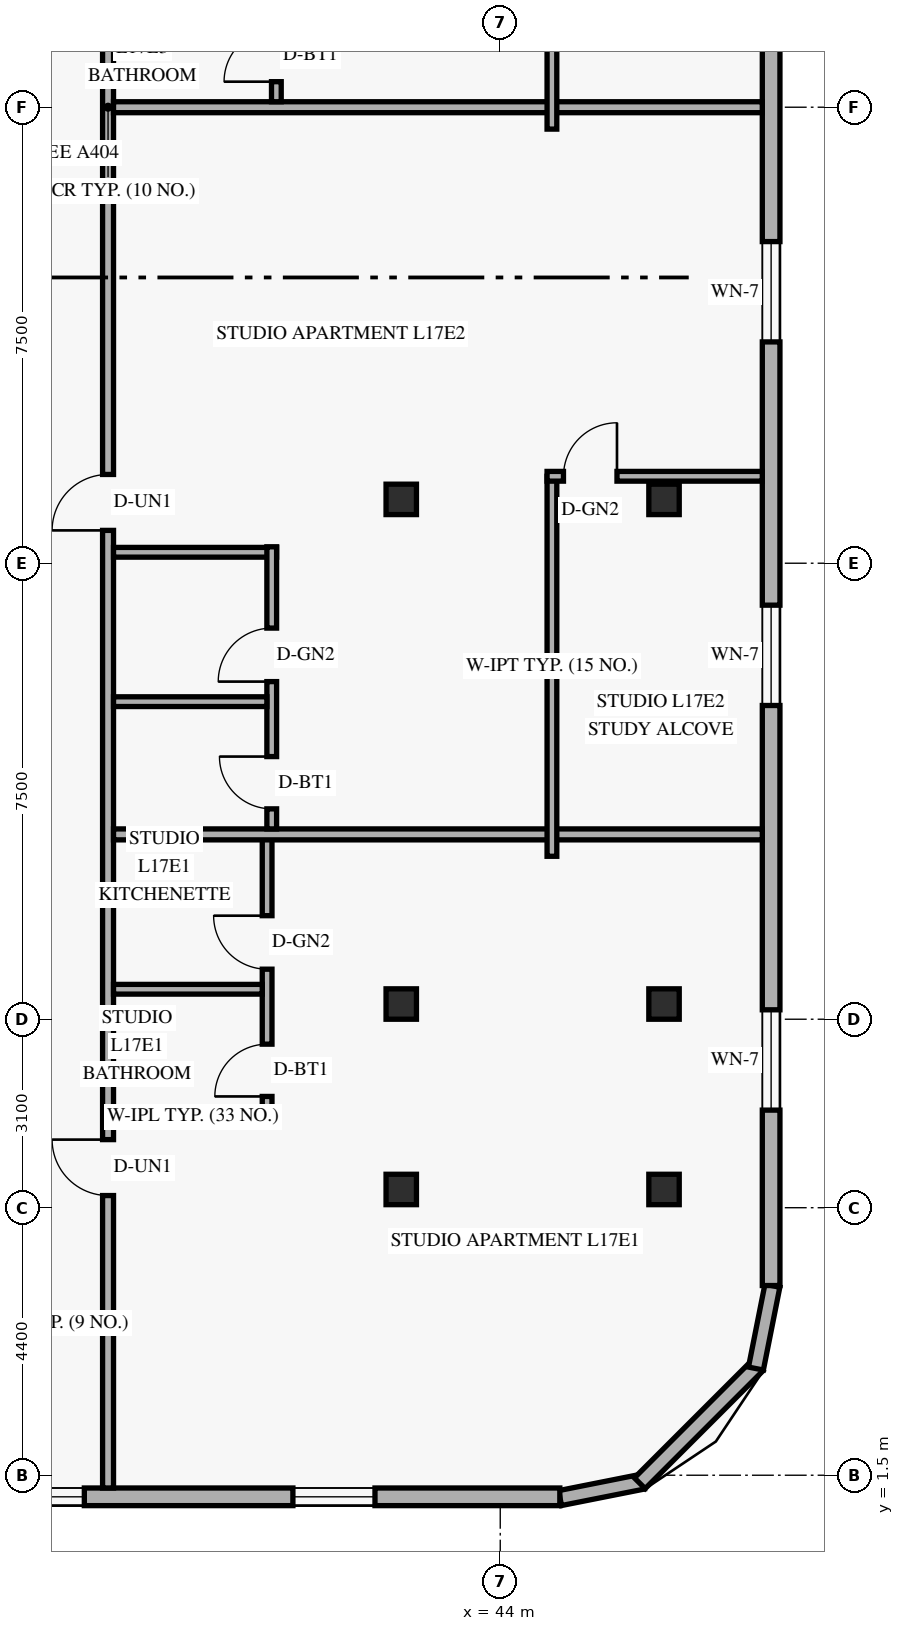
"""IFC4 building model, lengths in metres.
Left out: names, types, materials, properties, quantities, classifications, styles, units other than length and angle.
Written with IfcOpenShell. Run it as: python <this file> out.ifc"""

import sys

from ifc_helpers import new_model, si_unit, direction, frame, frame_2d, origin, origin_2d, place, context, subcontext, project, spatial, rectangle, hollow_rectangle, extrude, element, fill, save


model = new_model("IFC4")
c1 = context("Model", 3, precision=1e-05, world=origin(), true_north=direction((0.0, 1.0)))
c2 = subcontext(c1, "Body", "Model", "MODEL_VIEW")
j1 = project(units=[si_unit("LENGTHUNIT", "METRE"), si_unit("PLANEANGLEUNIT", "RADIAN")], contexts=[c1])
p1 = place(None, origin())
s1 = spatial("IfcSite", under=j1, at=p1, CompositionType="ELEMENT")
p2 = place(p1, origin())
s2 = spatial("IfcBuilding", under=s1, at=p2, CompositionType="ELEMENT")
p3 = place(p2, frame((0.0, 0.0, 67.8)))
s3 = spatial("IfcBuildingStorey", under=s2, at=p3, CompositionType="ELEMENT", Elevation=67.8)
for number, where, z_axis, x_axis in (
    (1, (42.309, 6.2, 0.0), (0.035, 0.0, 0.999), (0.0, 1.0, 0.0)),
    (2, (42.309, 9.25, 0.0), (0.035, 0.0, 0.999), (0.0, 1.0, 0.0)),
    (3, (42.309, 17.55, 0.0), (0.035, 0.0, 0.999), (0.0, 1.0, 0.0)),
):
    element("IfcColumn", number, at=place(p3, frame(where, z_axis=z_axis, x_axis=x_axis)), inside=s3, PredefinedType="COLUMN", context=c2, shape_type="SweptSolid", body=[
        extrude(hollow_rectangle(XDim=0.5, YDim=0.5, WallThickness=0.022, at=origin_2d()), origin(), (0.0, 0.0, 1.0), 3.602),
    ])
for number, where, z_axis, x_axis in (
    (4, (46.589, 6.2, 0.0), (0.058, 0.0, 0.998), (0.0, 1.0, 0.0)),
    (5, (46.589, 9.25, 0.0), (0.058, 0.0, 0.998), (0.0, 1.0, 0.0)),
    (6, (46.589, 17.55, 0.0), (0.058, 0.0, 0.998), (0.0, 1.0, 0.0)),
):
    element("IfcColumn", number, at=place(p3, frame(where, z_axis=z_axis, x_axis=x_axis)), inside=s3, PredefinedType="COLUMN", context=c2, shape_type="SweptSolid", body=[
        extrude(hollow_rectangle(XDim=0.5, YDim=0.5, WallThickness=0.022, at=origin_2d()), origin(), (0.0, 0.0, 1.0), 3.606),
    ])
p4 = place(p3, frame((44.983, 1.124, 0.0), z_axis=(0.0, 0.0, 1.0), x_axis=(0.980809899341, 0.19496651342, 0.0)))
e7 = element("IfcWall", 7, at=p4, inside=s3, PredefinedType="SOLIDWALL", context=c2, shape_type="SweptSolid", body=[
    extrude(rectangle(XDim=1.389, YDim=0.25, at=frame_2d((0.694, 0.0))), origin(), (0.0, 0.0, 1.0), 3.3),
])
p5 = place(p3, frame((46.295, 1.368, 0.0), z_axis=(0.0, 0.0, 1.0), x_axis=(0.707106781187, 0.707106781187, 0.0)))
e8 = element("IfcWall", 8, at=p5, inside=s3, PredefinedType="SOLIDWALL", context=c2, shape_type="SweptSolid", body=[
    extrude(rectangle(XDim=2.739, YDim=0.25, at=frame_2d((1.37, 0.0))), origin(), (0.0, 0.0, 1.0), 3.3),
])
p6 = place(p3, frame((48.205, 3.254, 0.0), z_axis=(0.0, 0.0, 1.0), x_axis=(0.19496651342, 0.980809899341, 0.0)))
e9 = element("IfcWall", 9, at=p6, inside=s3, PredefinedType="SOLIDWALL", context=c2, shape_type="SweptSolid", body=[
    extrude(rectangle(XDim=1.389, YDim=0.25, at=frame_2d((0.694, 0.0))), origin(), (0.0, 0.0, 1.0), 3.3),
])
p7 = place(p3, frame((5.42, 1.145, 0.0), z_axis=(0.0, 0.0, 1.0), x_axis=(1.0, 0.0, 0.0)))
e10 = element("IfcWall", 10, at=p7, inside=s3, PredefinedType="SOLIDWALL", context=c2, shape_type="SweptSolid", body=[
    extrude(rectangle(XDim=39.56, YDim=0.29, at=frame_2d((19.78, 0.0))), origin(), (0.0, 0.0, 1.0), 3.3),
])
p8 = place(p7, frame((2.765, 0.0, 0.85)))
e11 = element("IfcOpeningElement", 11, at=p8, cuts=e10, PredefinedType="OPENING", context=c2, shape_type="SweptSolid", body=[
    extrude(rectangle(XDim=1.35, YDim=1.55, at=frame_2d((0.675, 0.775))), frame((0.0, 0.155, 0.0), z_axis=(0.0, -1.0, 0.0), x_axis=(1.0, 0.0, 0.0)), (0.0, 0.0, 1.0), 0.31),
])
p9 = place(p7, frame((7.18, 0.0, 0.85)))
e12 = element("IfcOpeningElement", 12, at=p9, cuts=e10, PredefinedType="OPENING", context=c2, shape_type="SweptSolid", body=[
    extrude(rectangle(XDim=1.2, YDim=1.5, at=frame_2d((0.6, 0.75))), frame((0.0, 0.155, 0.0), z_axis=(0.0, -1.0, 0.0), x_axis=(1.0, 0.0, 0.0)), (0.0, 0.0, 1.0), 0.31),
])
p10 = place(p7, frame((12.056, 0.0, 0.85)))
e13 = element("IfcOpeningElement", 13, at=p10, cuts=e10, PredefinedType="OPENING", context=c2, shape_type="SweptSolid", body=[
    extrude(rectangle(XDim=1.35, YDim=1.55, at=frame_2d((0.675, 0.775))), frame((0.0, 0.155, 0.0), z_axis=(0.0, -1.0, 0.0), x_axis=(1.0, 0.0, 0.0)), (0.0, 0.0, 1.0), 0.31),
])
p11 = place(p7, frame((18.665, 0.0, 0.85)))
e14 = element("IfcOpeningElement", 14, at=p11, cuts=e10, PredefinedType="OPENING", context=c2, shape_type="SweptSolid", body=[
    extrude(rectangle(XDim=1.35, YDim=1.55, at=frame_2d((0.675, 0.775))), frame((0.0, 0.155, 0.0), z_axis=(0.0, -1.0, 0.0), x_axis=(1.0, 0.0, 0.0)), (0.0, 0.0, 1.0), 0.31),
])
p12 = place(p7, frame((25.274, 0.0, 0.85)))
e15 = element("IfcOpeningElement", 15, at=p12, cuts=e10, PredefinedType="OPENING", context=c2, shape_type="SweptSolid", body=[
    extrude(rectangle(XDim=1.35, YDim=1.55, at=frame_2d((0.675, 0.775))), frame((0.0, 0.155, 0.0), z_axis=(0.0, -1.0, 0.0), x_axis=(1.0, 0.0, 0.0)), (0.0, 0.0, 1.0), 0.31),
])
p13 = place(p7, frame((30.39, 0.0, 0.85)))
e16 = element("IfcOpeningElement", 16, at=p13, cuts=e10, PredefinedType="OPENING", context=c2, shape_type="SweptSolid", body=[
    extrude(rectangle(XDim=1.35, YDim=1.55, at=frame_2d((0.675, 0.775))), frame((0.0, 0.155, 0.0), z_axis=(0.0, -1.0, 0.0), x_axis=(1.0, 0.0, 0.0)), (0.0, 0.0, 1.0), 0.31),
])
p14 = place(p7, frame((35.17, 0.0, 0.85)))
e17 = element("IfcOpeningElement", 17, at=p14, cuts=e10, PredefinedType="OPENING", context=c2, shape_type="SweptSolid", body=[
    extrude(rectangle(XDim=1.35, YDim=1.55, at=frame_2d((0.675, 0.775))), frame((0.0, 0.155, 0.0), z_axis=(0.0, -1.0, 0.0), x_axis=(1.0, 0.0, 0.0)), (0.0, 0.0, 1.0), 0.31),
])
p15 = place(p3, frame((48.455, 4.62, 0.0), z_axis=(0.0, 0.0, 1.0), x_axis=(0.0, 1.0, 0.0)))
e18 = element("IfcWall", 18, at=p15, inside=s3, PredefinedType="SOLIDWALL", context=c2, shape_type="SweptSolid", body=[
    extrude(rectangle(XDim=38.76, YDim=0.29, at=frame_2d((19.38, 0.0))), origin(), (0.0, 0.0, 1.0), 3.3),
])
p16 = place(p15, frame((2.885, 0.0, 0.85)))
e19 = element("IfcOpeningElement", 19, at=p16, cuts=e18, PredefinedType="OPENING", context=c2, shape_type="SweptSolid", body=[
    extrude(rectangle(XDim=1.65, YDim=1.6, at=frame_2d((0.825, 0.8))), frame((0.0, 0.155, 0.0), z_axis=(0.0, -1.0, 0.0), x_axis=(1.0, 0.0, 0.0)), (0.0, 0.0, 1.0), 0.31),
])
p17 = place(p15, frame((9.54, 0.0, 0.85)))
e20 = element("IfcOpeningElement", 20, at=p17, cuts=e18, PredefinedType="OPENING", context=c2, shape_type="SweptSolid", body=[
    extrude(rectangle(XDim=1.65, YDim=1.6, at=frame_2d((0.825, 0.8))), frame((0.0, 0.155, 0.0), z_axis=(0.0, -1.0, 0.0), x_axis=(1.0, 0.0, 0.0)), (0.0, 0.0, 1.0), 0.31),
])
p18 = place(p15, frame((15.52, 0.0, 0.85)))
e21 = element("IfcOpeningElement", 21, at=p18, cuts=e18, PredefinedType="OPENING", context=c2, shape_type="SweptSolid", body=[
    extrude(rectangle(XDim=1.65, YDim=1.6, at=frame_2d((0.825, 0.8))), frame((0.0, 0.155, 0.0), z_axis=(0.0, -1.0, 0.0), x_axis=(1.0, 0.0, 0.0)), (0.0, 0.0, 1.0), 0.31),
])
p19 = place(p15, frame((21.5, 0.0, 0.85)))
e22 = element("IfcOpeningElement", 22, at=p19, cuts=e18, PredefinedType="OPENING", context=c2, shape_type="SweptSolid", body=[
    extrude(rectangle(XDim=1.65, YDim=1.6, at=frame_2d((0.825, 0.8))), frame((0.0, 0.155, 0.0), z_axis=(0.0, -1.0, 0.0), x_axis=(1.0, 0.0, 0.0)), (0.0, 0.0, 1.0), 0.31),
])
p20 = place(p15, frame((27.48, 0.0, 0.85)))
e23 = element("IfcOpeningElement", 23, at=p20, cuts=e18, PredefinedType="OPENING", context=c2, shape_type="SweptSolid", body=[
    extrude(rectangle(XDim=1.65, YDim=1.6, at=frame_2d((0.825, 0.8))), frame((0.0, 0.155, 0.0), z_axis=(0.0, -1.0, 0.0), x_axis=(1.0, 0.0, 0.0)), (0.0, 0.0, 1.0), 0.31),
])
p21 = place(p15, frame((34.225, 0.0, 0.85)))
e24 = element("IfcOpeningElement", 24, at=p21, cuts=e18, PredefinedType="OPENING", context=c2, shape_type="SweptSolid", body=[
    extrude(rectangle(XDim=1.65, YDim=1.6, at=frame_2d((0.825, 0.8))), frame((0.0, 0.155, 0.0), z_axis=(0.0, -1.0, 0.0), x_axis=(1.0, 0.0, 0.0)), (0.0, 0.0, 1.0), 0.31),
])
p22 = place(p3, frame((37.55, 1.29, 0.0), z_axis=(0.0, 0.0, 1.0), x_axis=(0.0, 1.0, 0.0)))
e25 = element("IfcWall", 25, at=p22, inside=s3, PredefinedType="STANDARD", context=c2, shape_type="SweptSolid", body=[
    extrude(rectangle(XDim=45.42, YDim=0.18, at=frame_2d((22.71, 0.0))), origin(), (0.0, 0.0, 1.0), 2.589),
])
p23 = place(p22, frame((4.81, 0.0, 0.0)))
e26 = element("IfcOpeningElement", 26, at=p23, cuts=e25, PredefinedType="OPENING", context=c2, shape_type="SweptSolid", body=[
    extrude(rectangle(XDim=0.92, YDim=2.15, at=frame_2d((0.46, 1.075))), frame((0.0, 0.1, 0.0), z_axis=(0.0, -1.0, 0.0), x_axis=(1.0, 0.0, 0.0)), (0.0, 0.0, 1.0), 0.2),
])
p24 = place(p22, frame((15.75, 0.0, 0.0)))
e27 = element("IfcOpeningElement", 27, at=p24, cuts=e25, PredefinedType="OPENING", context=c2, shape_type="SweptSolid", body=[
    extrude(rectangle(XDim=0.92, YDim=2.15, at=frame_2d((0.46, 1.075))), frame((0.0, 0.1, 0.0), z_axis=(0.0, -1.0, 0.0), x_axis=(1.0, 0.0, 0.0)), (0.0, 0.0, 1.0), 0.2),
])
p25 = place(p22, frame((27.71, 0.0, 0.0)))
e28 = element("IfcOpeningElement", 28, at=p25, cuts=e25, PredefinedType="OPENING", context=c2, shape_type="SweptSolid", body=[
    extrude(rectangle(XDim=0.92, YDim=2.15, at=frame_2d((0.46, 1.075))), frame((0.0, 0.1, 0.0), z_axis=(0.0, -1.0, 0.0), x_axis=(1.0, 0.0, 0.0)), (0.0, 0.0, 1.0), 0.2),
])
p26 = place(p22, frame((36.422, 0.0, 0.0)))
e29 = element("IfcOpeningElement", 29, at=p26, cuts=e25, PredefinedType="OPENING", context=c2, shape_type="SweptSolid", body=[
    extrude(rectangle(XDim=0.92, YDim=2.15, at=frame_2d((0.46, 1.075))), frame((0.0, 0.1, 0.0), z_axis=(0.0, -1.0, 0.0), x_axis=(1.0, 0.0, 0.0)), (0.0, 0.0, 1.0), 0.2),
])
p27 = place(p3, frame((37.64, 7.4, 0.0), z_axis=(0.0, 0.0, 1.0), x_axis=(1.0, 0.0, 0.0)))
e30 = element("IfcWall", 30, at=p27, inside=s3, PredefinedType="PLUMBINGWALL", context=c2, shape_type="SweptSolid", body=[
    extrude(rectangle(XDim=2.606, YDim=0.16, at=frame_2d((1.303, 0.0))), origin(), (0.0, 0.0, 1.0), 3.3),
])
p28 = place(p3, frame((40.166, 7.31, 0.0), z_axis=(0.0, 0.0, 1.0), x_axis=(0.0, 1.0, 0.0)))
e31 = element("IfcWall", 31, at=p28, inside=s3, PredefinedType="PLUMBINGWALL", context=c2, shape_type="SweptSolid", body=[
    extrude(rectangle(XDim=4.73, YDim=0.16, at=frame_2d((2.365, 0.0))), origin(), (0.0, 0.0, 1.0), 2.589),
])
p29 = place(p28, frame((0.42, 0.0, 0.0)))
e32 = element("IfcOpeningElement", 32, at=p29, cuts=e31, PredefinedType="OPENING", context=c2, shape_type="SweptSolid", body=[
    extrude(rectangle(XDim=0.86, YDim=2.12, at=frame_2d((0.43, 1.06))), frame((0.0, 0.09, 0.0), z_axis=(0.0, -1.0, 0.0), x_axis=(1.0, 0.0, 0.0)), (0.0, 0.0, 1.0), 0.18),
])
p30 = place(p28, frame((2.513, 0.0, 0.0)))
e33 = element("IfcOpeningElement", 33, at=p30, cuts=e31, PredefinedType="OPENING", context=c2, shape_type="SweptSolid", body=[
    extrude(rectangle(XDim=0.88, YDim=2.12, at=frame_2d((0.44, 1.06))), frame((0.0, 0.09, 0.0), z_axis=(0.0, -1.0, 0.0), x_axis=(1.0, 0.0, 0.0)), (0.0, 0.0, 1.0), 0.18),
])
p31 = place(p3, frame((37.64, 9.493, 0.0), z_axis=(0.0, 0.0, 1.0), x_axis=(1.0, 0.0, 0.0)))
e34 = element("IfcWall", 34, at=p31, inside=s3, PredefinedType="PLUMBINGWALL", context=c2, shape_type="SweptSolid", body=[
    extrude(rectangle(XDim=2.446, YDim=0.16, at=frame_2d((1.223, 0.0))), origin(), (0.0, 0.0, 1.0), 3.3),
])
p32 = place(p3, frame((37.64, 12.04, 0.0), z_axis=(0.0, 0.0, 1.0), x_axis=(1.0, 0.0, 0.0)))
e35 = element("IfcWall", 35, at=p32, inside=s3, PredefinedType="PARTITIONING", context=c2, shape_type="SweptSolid", body=[
    extrude(rectangle(XDim=10.67, YDim=0.18, at=frame_2d((5.335, 0.0))), origin(), (0.0, 0.0, 1.0), 2.589),
])
p33 = place(p3, frame((37.64, 16.68, 0.0), z_axis=(0.0, 0.0, 1.0), x_axis=(1.0, 0.0, 0.0)))
e36 = element("IfcWall", 36, at=p33, inside=s3, PredefinedType="PLUMBINGWALL", context=c2, shape_type="SweptSolid", body=[
    extrude(rectangle(XDim=2.682, YDim=0.16, at=frame_2d((1.341, 0.0))), origin(), (0.0, 0.0, 1.0), 3.3),
])
p34 = place(p3, frame((40.242, 12.13, 0.0), z_axis=(0.0, 0.0, 1.0), x_axis=(0.0, 1.0, 0.0)))
e37 = element("IfcWall", 37, at=p34, inside=s3, PredefinedType="PLUMBINGWALL", context=c2, shape_type="SweptSolid", body=[
    extrude(rectangle(XDim=4.64, YDim=0.16, at=frame_2d((2.32, 0.0))), origin(), (0.0, 0.0, 1.0), 2.872),
])
p35 = place(p34, frame((0.33, 0.0, 0.0)))
e38 = element("IfcOpeningElement", 38, at=p35, cuts=e37, PredefinedType="OPENING", context=c2, shape_type="SweptSolid", body=[
    extrude(rectangle(XDim=0.86, YDim=2.12, at=frame_2d((0.43, 1.06))), frame((0.0, 0.09, 0.0), z_axis=(0.0, -1.0, 0.0), x_axis=(1.0, 0.0, 0.0)), (0.0, 0.0, 1.0), 0.18),
])
p36 = place(p34, frame((2.423, 0.0, 0.0)))
e39 = element("IfcOpeningElement", 39, at=p36, cuts=e37, PredefinedType="OPENING", context=c2, shape_type="SweptSolid", body=[
    extrude(rectangle(XDim=0.88, YDim=2.12, at=frame_2d((0.44, 1.06))), frame((0.0, 0.09, 0.0), z_axis=(0.0, -1.0, 0.0), x_axis=(1.0, 0.0, 0.0)), (0.0, 0.0, 1.0), 0.18),
])
p37 = place(p3, frame((37.64, 14.223, 0.0), z_axis=(0.0, 0.0, 1.0), x_axis=(1.0, 0.0, 0.0)))
e40 = element("IfcWall", 40, at=p37, inside=s3, PredefinedType="PLUMBINGWALL", context=c2, shape_type="SweptSolid", body=[
    extrude(rectangle(XDim=2.522, YDim=0.16, at=frame_2d((1.261, 0.0))), origin(), (0.0, 0.0, 1.0), 3.3),
])
p38 = place(p3, frame((44.85, 11.68, 0.0), z_axis=(0.0, 0.0, 1.0), x_axis=(0.0, 1.0, 0.0)))
e41 = element("IfcWall", 41, at=p38, inside=s3, PredefinedType="PARTITIONING", context=c2, shape_type="SweptSolid", body=[
    extrude(rectangle(XDim=6.25, YDim=0.16, at=frame_2d((3.125, 0.0))), origin(), (0.0, 0.0, 1.0), 2.589),
])
p39 = place(p3, frame((44.77, 17.93, 0.0), z_axis=(0.0, 0.0, 1.0), x_axis=(1.0, 0.0, 0.0)))
e42 = element("IfcWall", 42, at=p39, inside=s3, PredefinedType="PARTITIONING", context=c2, shape_type="SweptSolid", body=[
    extrude(rectangle(XDim=3.54, YDim=0.16, at=frame_2d((1.77, 0.0))), origin(), (0.0, 0.0, 1.0), 2.749),
])
p40 = place(p39, frame((0.27, 0.0, 0.0)))
e43 = element("IfcOpeningElement", 43, at=p40, cuts=e42, PredefinedType="OPENING", context=c2, shape_type="SweptSolid", body=[
    extrude(rectangle(XDim=0.88, YDim=2.12, at=frame_2d((0.44, 1.06))), frame((0.0, 0.09, 0.0), z_axis=(0.0, -1.0, 0.0), x_axis=(1.0, 0.0, 0.0)), (0.0, 0.0, 1.0), 0.18),
])
p41 = place(p3, frame((37.64, 24.0, 0.0), z_axis=(0.0, 0.0, 1.0), x_axis=(1.0, 0.0, 0.0)))
e44 = element("IfcWall", 44, at=p41, inside=s3, PredefinedType="PARTITIONING", context=c2, shape_type="SweptSolid", body=[
    extrude(rectangle(XDim=10.67, YDim=0.18, at=frame_2d((5.335, 0.0))), origin(), (0.0, 0.0, 1.0), 2.589),
])
p42 = place(p3, frame((40.318, 24.09, 0.0), z_axis=(0.0, 0.0, 1.0), x_axis=(0.0, 1.0, 0.0)))
e45 = element("IfcWall", 45, at=p42, inside=s3, PredefinedType="PLUMBINGWALL", context=c2, shape_type="SweptSolid", body=[
    extrude(rectangle(XDim=4.64, YDim=0.16, at=frame_2d((2.32, 0.0))), origin(), (0.0, 0.0, 1.0), 3.3),
])
p43 = place(p42, frame((0.33, 0.0, 0.0)))
e46 = element("IfcOpeningElement", 46, at=p43, cuts=e45, PredefinedType="OPENING", context=c2, shape_type="SweptSolid", body=[
    extrude(rectangle(XDim=0.86, YDim=2.12, at=frame_2d((0.43, 1.06))), frame((0.0, 0.09, 0.0), z_axis=(0.0, -1.0, 0.0), x_axis=(1.0, 0.0, 0.0)), (0.0, 0.0, 1.0), 0.18),
])
p44 = place(p42, frame((2.423, 0.0, 0.0)))
e47 = element("IfcOpeningElement", 47, at=p44, cuts=e45, PredefinedType="OPENING", context=c2, shape_type="SweptSolid", body=[
    extrude(rectangle(XDim=0.88, YDim=2.12, at=frame_2d((0.44, 1.06))), frame((0.0, 0.09, 0.0), z_axis=(0.0, -1.0, 0.0), x_axis=(1.0, 0.0, 0.0)), (0.0, 0.0, 1.0), 0.18),
])
p45 = place(p3, frame((44.85, 23.64, 0.0), z_axis=(0.0, 0.0, 1.0), x_axis=(0.0, 1.0, 0.0)))
e48 = element("IfcWall", 48, at=p45, inside=s3, PredefinedType="PARTITIONING", context=c2, shape_type="SweptSolid", body=[
    extrude(rectangle(XDim=6.25, YDim=0.16, at=frame_2d((3.125, 0.0))), origin(), (0.0, 0.0, 1.0), 3.3),
])
p46 = place(p13, origin())
e49 = element("IfcWindow", 49, at=p46, inside=s3, PartitioningType="SINGLE_PANEL", PredefinedType="WINDOW", context=c2, shape_type="SweptSolid", body=[
    extrude(rectangle(XDim=1.35, YDim=1.55, at=frame_2d((0.675, 0.775))), frame((0.0, 0.03, 0.0), z_axis=(0.0, -1.0, 0.0), x_axis=(1.0, 0.0, 0.0)), (0.0, 0.0, 1.0), 0.06),
])
fill(e16, e49)
p47 = place(p14, origin())
e50 = element("IfcWindow", 50, at=p47, inside=s3, PartitioningType="SINGLE_PANEL", PredefinedType="WINDOW", context=c2, shape_type="SweptSolid", body=[
    extrude(rectangle(XDim=1.35, YDim=1.55, at=frame_2d((0.675, 0.775))), frame((0.0, 0.03, 0.0), z_axis=(0.0, -1.0, 0.0), x_axis=(1.0, 0.0, 0.0)), (0.0, 0.0, 1.0), 0.06),
])
fill(e17, e50)
p48 = place(p16, origin())
e51 = element("IfcWindow", 51, at=p48, inside=s3, PartitioningType="SINGLE_PANEL", PredefinedType="WINDOW", context=c2, shape_type="SweptSolid", body=[
    extrude(rectangle(XDim=1.65, YDim=1.6, at=frame_2d((0.825, 0.8))), frame((0.0, 0.03, 0.0), z_axis=(0.0, -1.0, 0.0), x_axis=(1.0, 0.0, 0.0)), (0.0, 0.0, 1.0), 0.06),
])
fill(e19, e51)
p49 = place(p17, origin())
e52 = element("IfcWindow", 52, at=p49, inside=s3, PartitioningType="SINGLE_PANEL", PredefinedType="WINDOW", context=c2, shape_type="SweptSolid", body=[
    extrude(rectangle(XDim=1.65, YDim=1.6, at=frame_2d((0.825, 0.8))), frame((0.0, 0.03, 0.0), z_axis=(0.0, -1.0, 0.0), x_axis=(1.0, 0.0, 0.0)), (0.0, 0.0, 1.0), 0.06),
])
fill(e20, e52)
p50 = place(p18, origin())
e53 = element("IfcWindow", 53, at=p50, inside=s3, PartitioningType="SINGLE_PANEL", PredefinedType="WINDOW", context=c2, shape_type="SweptSolid", body=[
    extrude(rectangle(XDim=1.65, YDim=1.6, at=frame_2d((0.825, 0.8))), frame((0.0, 0.03, 0.0), z_axis=(0.0, -1.0, 0.0), x_axis=(1.0, 0.0, 0.0)), (0.0, 0.0, 1.0), 0.06),
])
fill(e21, e53)
p51 = place(p23, origin())
e54 = element("IfcDoor", 54, at=p51, inside=s3, OperationType="SINGLE_SWING_RIGHT", PredefinedType="DOOR", context=c2, shape_type="SweptSolid", body=[
    extrude(rectangle(XDim=0.92, YDim=2.15, at=frame_2d((0.46, 1.075))), frame((0.0, 0.025, 0.0), z_axis=(0.0, -1.0, 0.0), x_axis=(1.0, 0.0, 0.0)), (0.0, 0.0, 1.0), 0.05),
])
fill(e26, e54)
p52 = place(p29, origin())
e55 = element("IfcDoor", 55, at=p52, inside=s3, OperationType="SINGLE_SWING_LEFT", PredefinedType="DOOR", context=c2, shape_type="SweptSolid", body=[
    extrude(rectangle(XDim=0.86, YDim=2.12, at=frame_2d((0.43, 1.06))), frame((0.0, 0.025, 0.0), z_axis=(0.0, -1.0, 0.0), x_axis=(1.0, 0.0, 0.0)), (0.0, 0.0, 1.0), 0.05),
])
fill(e32, e55)
p53 = place(p30, origin())
e56 = element("IfcDoor", 56, at=p53, inside=s3, OperationType="SINGLE_SWING_RIGHT", PredefinedType="DOOR", context=c2, shape_type="SweptSolid", body=[
    extrude(rectangle(XDim=0.88, YDim=2.12, at=frame_2d((0.44, 1.06))), frame((0.0, 0.025, 0.0), z_axis=(0.0, -1.0, 0.0), x_axis=(1.0, 0.0, 0.0)), (0.0, 0.0, 1.0), 0.05),
])
fill(e33, e56)
p54 = place(p40, origin())
e57 = element("IfcDoor", 57, at=p54, inside=s3, OperationType="SINGLE_SWING_RIGHT", PredefinedType="DOOR", context=c2, shape_type="SweptSolid", body=[
    extrude(rectangle(XDim=0.88, YDim=2.12, at=frame_2d((0.44, 1.06))), frame((0.0, 0.025, 0.0), z_axis=(0.0, -1.0, 0.0), x_axis=(1.0, 0.0, 0.0)), (0.0, 0.0, 1.0), 0.05),
])
fill(e43, e57)
p55 = place(p24, origin())
e58 = element("IfcDoor", 58, at=p55, inside=s3, OperationType="SINGLE_SWING_LEFT", PredefinedType="DOOR", context=c2, shape_type="SweptSolid", body=[
    extrude(rectangle(XDim=0.92, YDim=2.15, at=frame_2d((0.46, 1.075))), frame((0.0, 0.025, 0.0), z_axis=(0.0, -1.0, 0.0), x_axis=(1.0, 0.0, 0.0)), (0.0, 0.0, 1.0), 0.05),
])
fill(e27, e58)
p56 = place(p35, origin())
e59 = element("IfcDoor", 59, at=p56, inside=s3, OperationType="SINGLE_SWING_RIGHT", PredefinedType="DOOR", context=c2, shape_type="SweptSolid", body=[
    extrude(rectangle(XDim=0.86, YDim=2.12, at=frame_2d((0.43, 1.06))), frame((0.0, 0.025, 0.0), z_axis=(0.0, -1.0, 0.0), x_axis=(1.0, 0.0, 0.0)), (0.0, 0.0, 1.0), 0.05),
])
fill(e38, e59)
p57 = place(p36, origin())
e60 = element("IfcDoor", 60, at=p57, inside=s3, OperationType="SINGLE_SWING_LEFT", PredefinedType="DOOR", context=c2, shape_type="SweptSolid", body=[
    extrude(rectangle(XDim=0.88, YDim=2.12, at=frame_2d((0.44, 1.06))), frame((0.0, 0.025, 0.0), z_axis=(0.0, -1.0, 0.0), x_axis=(1.0, 0.0, 0.0)), (0.0, 0.0, 1.0), 0.05),
])
fill(e39, e60)
p58 = place(p43, origin())
e61 = element("IfcDoor", 61, at=p58, inside=s3, OperationType="SINGLE_SWING_LEFT", PredefinedType="DOOR", context=c2, shape_type="SweptSolid", body=[
    extrude(rectangle(XDim=0.86, YDim=2.12, at=frame_2d((0.43, 1.06))), frame((0.0, 0.025, 0.0), z_axis=(0.0, -1.0, 0.0), x_axis=(1.0, 0.0, 0.0)), (0.0, 0.0, 1.0), 0.05),
])
fill(e46, e61)
save(model, sys.argv[1])
